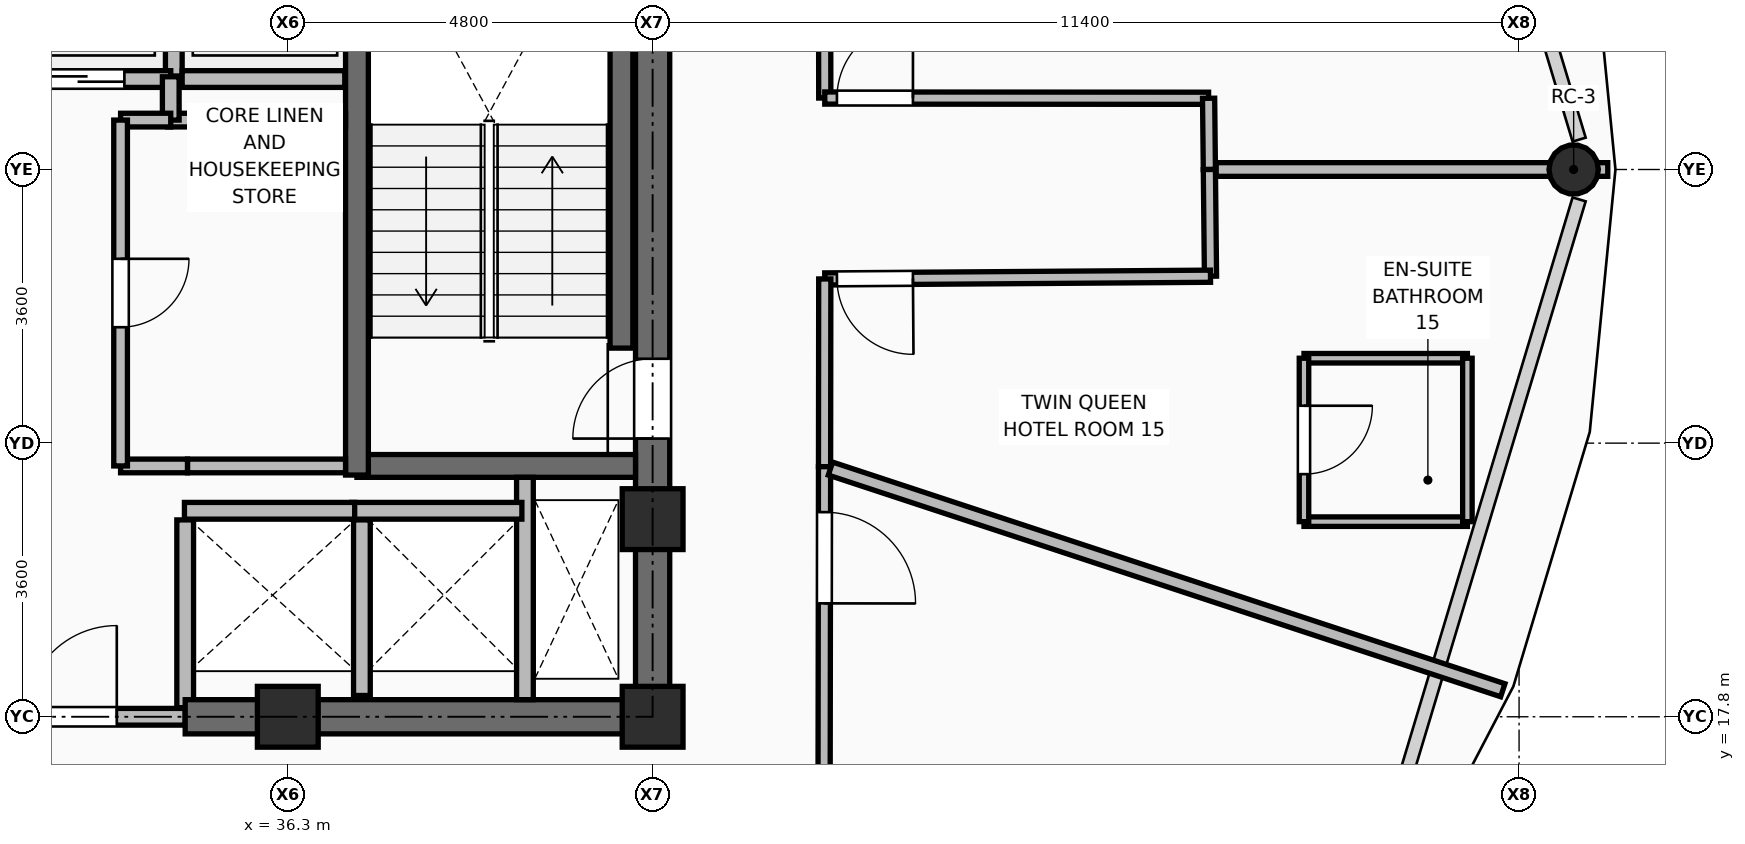
"""IFC4 building model, lengths in metres.
Left out: names, types, materials, properties, quantities, classifications, styles, units other than length and angle.
Written with IfcOpenShell. Run it as: python <this file> out.ifc"""

import sys

from ifc_helpers import new_model, si_unit, direction, frame, frame_2d, origin, origin_2d, place, context, subcontext, project, spatial, rectangle, hollow_circle, extrude, element, fill, save


model = new_model("IFC4")
c1 = context("Model", 3, precision=1e-05, world=origin(), true_north=direction((0.0, 1.0)))
c2 = subcontext(c1, "Body", "Model", "MODEL_VIEW")
j1 = project(units=[si_unit("LENGTHUNIT", "METRE"), si_unit("PLANEANGLEUNIT", "RADIAN")], contexts=[c1])
p1 = place(None, origin())
s1 = spatial("IfcSite", under=j1, at=p1, CompositionType="ELEMENT")
p2 = place(p1, origin())
s2 = spatial("IfcBuilding", under=s1, at=p2, CompositionType="ELEMENT")
p3 = place(p2, frame((0.0, 0.0, 249.9)))
s3 = spatial("IfcBuildingStorey", under=s2, at=p3, CompositionType="ELEMENT", Elevation=249.9)
for number, where, z_axis, x_axis in (
    (1, (36.3, 17.8, 0.0), (0.0, 0.0, 1.0), (1.0, 0.0, 0.0)),
    (2, (41.1, 17.8, 0.0), (0.0, 0.0, 1.0), (1.0, 0.0, 0.0)),
    (3, (41.1, 20.4, 0.0), (0.0, 0.0, 1.0), (1.0, 0.0, 0.0)),
):
    element("IfcColumn", number, at=place(p3, frame(where, z_axis=z_axis, x_axis=x_axis)), inside=s3, PredefinedType="COLUMN", context=c2, shape_type="SweptSolid", body=[
        extrude(rectangle(XDim=0.8, YDim=0.8, at=origin_2d()), origin(), (0.0, 0.0, 1.0), 3.75),
    ])
p4 = place(p3, frame((53.218, 25.0, 0.0), z_axis=(-0.104543948341, 0.0, 0.9945202677), x_axis=(0.0, -1.0, 0.0)))
e4 = element("IfcColumn", 4, at=p4, inside=s3, PredefinedType="COLUMN", context=c2, shape_type="SweptSolid", body=[
    extrude(hollow_circle(Radius=0.325, WallThickness=0.03, at=origin_2d()), origin(), (0.0, 0.0, 1.0), 3.519),
])
p5 = place(p3, frame((34.95, 17.92, 0.0), z_axis=(0.0, 0.0, 1.0), x_axis=(0.0, 1.0, 0.0)))
e5 = element("IfcWall", 5, at=p5, inside=s3, PredefinedType="PARTITIONING", context=c2, shape_type="SweptSolid", body=[
    extrude(rectangle(XDim=2.47, YDim=0.22, at=frame_2d((1.235, 0.0))), origin(), (0.0, 0.0, 1.0), 3.475),
])
p6 = place(p3, frame((37.275, 18.08, 0.0), z_axis=(0.0, 0.0, 1.0), x_axis=(0.0, 1.0, 0.0)))
e6 = element("IfcWall", 6, at=p6, inside=s3, PredefinedType="PARTITIONING", context=c2, shape_type="SweptSolid", body=[
    extrude(rectangle(XDim=2.31, YDim=0.22, at=frame_2d((1.155, 0.0))), origin(), (0.0, 0.0, 1.0), 3.475),
])
p7 = place(p3, frame((34.8, 26.23, 0.0), z_axis=(0.0, 0.0, 1.0), x_axis=(0.0, 1.0, 0.0)))
e7 = element("IfcWall", 7, at=p7, inside=s3, PredefinedType="PARTITIONING", context=c2, shape_type="SweptSolid", body=[
    extrude(rectangle(XDim=2.21, YDim=0.22, at=frame_2d((1.105, 0.0))), origin(), (0.0, 0.0, 1.0), 3.475),
])
p8 = place(p3, frame((34.91, 26.19, 0.0), z_axis=(0.0, 0.0, 1.0), x_axis=(1.0, 0.0, 0.0)))
e8 = element("IfcWall", 8, at=p8, inside=s3, PredefinedType="PARTITIONING", context=c2, shape_type="SweptSolid", body=[
    extrude(rectangle(XDim=2.14, YDim=0.22, at=frame_2d((1.07, 0.0))), origin(), (0.0, 0.0, 1.0), 3.475),
])
p9 = place(p3, frame((32.45, 17.8, 0.0), z_axis=(0.0, 0.0, 1.0), x_axis=(1.0, 0.0, 0.0)))
e9 = element("IfcWall", 9, at=p9, inside=s3, PredefinedType="PARTITIONING", context=c2, shape_type="SweptSolid", body=[
    extrude(rectangle(XDim=2.5, YDim=0.22, at=frame_2d((1.25, 0.0))), origin(), (0.0, 0.0, 1.0), 3.012),
])
p10 = place(p9, frame((0.4, 0.0, 0.0)))
e10 = element("IfcOpeningElement", 10, at=p10, cuts=e9, PredefinedType="OPENING", context=c2, shape_type="SweptSolid", body=[
    extrude(rectangle(XDim=1.2, YDim=2.1, at=frame_2d((0.6, 1.05))), frame((0.0, 0.12, 0.0), z_axis=(0.0, -1.0, 0.0), x_axis=(1.0, 0.0, 0.0)), (0.0, 0.0, 1.0), 0.24),
])
p11 = place(p3, frame((34.95, 17.8, 0.0), z_axis=(0.0, 0.0, 1.0), x_axis=(1.0, 0.0, 0.0)))
e11 = element("IfcWall", 11, at=p11, inside=s3, PredefinedType="SHEAR", context=c2, shape_type="SweptSolid", body=[
    extrude(rectangle(XDim=6.375, YDim=0.45, at=frame_2d((3.188, 0.0))), origin(), (0.0, 0.0, 1.0), 3.5),
])
p12 = place(p3, frame((41.1, 18.025, 0.0), z_axis=(0.0, 0.0, 1.0), x_axis=(0.0, 1.0, 0.0)))
e12 = element("IfcWall", 12, at=p12, inside=s3, PredefinedType="SHEAR", context=c2, shape_type="SweptSolid", body=[
    extrude(rectangle(XDim=14.2, YDim=0.45, at=frame_2d((7.1, 0.0))), origin(), (0.0, 0.0, 1.0), 3.5),
])
p13 = place(p12, frame((3.435, 0.0, 0.0)))
e13 = element("IfcOpeningElement", 13, at=p13, cuts=e12, PredefinedType="OPENING", context=c2, shape_type="SweptSolid", body=[
    extrude(rectangle(XDim=1.05, YDim=2.1, at=frame_2d((0.525, 1.05))), frame((0.0, 0.235, 0.0), z_axis=(0.0, -1.0, 0.0), x_axis=(1.0, 0.0, 0.0)), (0.0, 0.0, 1.0), 0.47),
])
p14 = place(p3, frame((37.21, 21.1, 0.0), z_axis=(0.0, 0.0, 1.0), x_axis=(1.0, 0.0, 0.0)))
e14 = element("IfcWall", 14, at=p14, inside=s3, PredefinedType="SHEAR", context=c2, shape_type="SweptSolid", body=[
    extrude(rectangle(XDim=3.665, YDim=0.3, at=frame_2d((1.833, 0.0))), origin(), (0.0, 0.0, 1.0), 3.5),
])
p15 = place(p3, frame((37.21, 20.98, 0.0), z_axis=(0.0, 0.0, 1.0), x_axis=(0.0, 1.0, 0.0)))
e15 = element("IfcWall", 15, at=p15, inside=s3, PredefinedType="SHEAR", context=c2, shape_type="SweptSolid", body=[
    extrude(rectangle(XDim=7.99, YDim=0.3, at=frame_2d((3.995, 0.0))), origin(), (0.0, 0.0, 1.0), 3.5),
])
p16 = place(p3, frame((40.69, 22.65, 0.0), z_axis=(0.0, 0.0, 1.0), x_axis=(0.0, 1.0, 0.0)))
e16 = element("IfcWall", 16, at=p16, inside=s3, PredefinedType="SHEAR", context=c2, shape_type="SweptSolid", body=[
    extrude(rectangle(XDim=6.2, YDim=0.3, at=frame_2d((3.1, 0.0))), origin(), (0.0, 0.0, 1.0), 3.5),
])
p17 = place(p3, frame((39.42, 18.025, 0.0), z_axis=(0.0, 0.0, 1.0), x_axis=(0.0, 1.0, 0.0)))
e17 = element("IfcWall", 17, at=p17, inside=s3, PredefinedType="PARTITIONING", context=c2, shape_type="SweptSolid", body=[
    extrude(rectangle(XDim=2.925, YDim=0.22, at=frame_2d((1.462, 0.0))), origin(), (0.0, 0.0, 1.0), 3.48),
])
for number, where, z_axis, x_axis in (
    (18, (37.14, 20.51, 0.0), (0.0, 0.0, 1.0), (1.0, 0.0, 0.0)),
    (19, (34.94, 20.51, 0.0), (0.0, 0.0, 1.0), (1.0, 0.0, 0.0)),
):
    element("IfcWall", number, at=place(p3, frame(where, z_axis=z_axis, x_axis=x_axis)), inside=s3, PredefinedType="PARTITIONING", context=c2, shape_type="SweptSolid", body=[
        extrude(rectangle(XDim=2.24, YDim=0.22, at=frame_2d((1.12, 0.0))), origin(), (0.0, 0.0, 1.0), 3.48),
    ])
p18 = place(p3, frame((32.44, 26.19, 0.0), z_axis=(0.0, 0.0, 1.0), x_axis=(1.0, 0.0, 0.0)))
e20 = element("IfcWall", 20, at=p18, inside=s3, PredefinedType="PARTITIONING", context=c2, shape_type="SweptSolid", body=[
    extrude(rectangle(XDim=2.32, YDim=0.22, at=frame_2d((1.16, 0.0))), origin(), (0.0, 0.0, 1.0), 3.48),
])
p19 = place(p18, frame((0.61, 0.0, 0.0)))
e21 = element("IfcOpeningElement", 21, at=p19, cuts=e20, PredefinedType="OPENING", context=c2, shape_type="SweptSolid", body=[
    extrude(rectangle(XDim=1.1, YDim=2.2, at=frame_2d((0.55, 1.1))), frame((0.0, 0.12, 0.0), z_axis=(0.0, -1.0, 0.0), x_axis=(1.0, 0.0, 0.0)), (0.0, 0.0, 1.0), 0.24),
])
p20 = place(p3, frame((34.98, 21.1, 0.0), z_axis=(0.0, 0.0, 1.0), x_axis=(1.0, 0.0, 0.0)))
e22 = element("IfcWall", 22, at=p20, inside=s3, PredefinedType="PARTITIONING", context=c2, shape_type="SweptSolid", body=[
    extrude(rectangle(XDim=2.08, YDim=0.18, at=frame_2d((1.04, 0.0))), origin(), (0.0, 0.0, 1.0), 3.48),
])
p21 = place(p3, frame((34.72, 25.65, 0.0), z_axis=(0.0, 0.0, 1.0), x_axis=(1.0, 0.0, 0.0)))
e23 = element("IfcWall", 23, at=p21, inside=s3, PredefinedType="PARTITIONING", context=c2, shape_type="SweptSolid", body=[
    extrude(rectangle(XDim=2.34, YDim=0.18, at=frame_2d((1.17, 0.0))), origin(), (0.0, 0.0, 1.0), 3.48),
])
p22 = place(p3, frame((34.76, 25.65, 0.0), z_axis=(0.0, 0.0, 1.0), x_axis=(0.0, 1.0, 0.0)))
e24 = element("IfcWall", 24, at=p22, inside=s3, PredefinedType="PARTITIONING", context=c2, shape_type="SweptSolid", body=[
    extrude(rectangle(XDim=0.57, YDim=0.22, at=frame_2d((0.285, 0.0))), origin(), (0.0, 0.0, 1.0), 3.48),
])
p23 = place(p3, frame((34.1, 21.1, 0.0), z_axis=(0.0, 0.0, 1.0), x_axis=(1.0, 0.0, 0.0)))
e25 = element("IfcWall", 25, at=p23, inside=s3, PredefinedType="PARTITIONING", context=c2, shape_type="SweptSolid", body=[
    extrude(rectangle(XDim=0.88, YDim=0.18, at=frame_2d((0.44, 0.0))), origin(), (0.0, 0.0, 1.0), 3.48),
])
p24 = place(p3, frame((34.1, 25.65, 0.0), z_axis=(0.0, 0.0, 1.0), x_axis=(1.0, 0.0, 0.0)))
e26 = element("IfcWall", 26, at=p24, inside=s3, PredefinedType="PARTITIONING", context=c2, shape_type="SweptSolid", body=[
    extrude(rectangle(XDim=0.66, YDim=0.18, at=frame_2d((0.33, 0.0))), origin(), (0.0, 0.0, 1.0), 3.48),
])
p25 = place(p3, frame((34.1, 21.1, 0.0), z_axis=(0.0, 0.0, 1.0), x_axis=(0.0, 1.0, 0.0)))
e27 = element("IfcWall", 27, at=p25, inside=s3, PredefinedType="PARTITIONING", context=c2, shape_type="SweptSolid", body=[
    extrude(rectangle(XDim=4.55, YDim=0.18, at=frame_2d((2.275, 0.0))), origin(), (0.0, 0.0, 1.0), 3.48),
])
p26 = place(p25, frame((1.825, 0.0, 0.0)))
e28 = element("IfcOpeningElement", 28, at=p26, cuts=e27, PredefinedType="OPENING", context=c2, shape_type="SweptSolid", body=[
    extrude(rectangle(XDim=0.9, YDim=2.1, at=frame_2d((0.45, 1.05))), frame((0.0, 0.1, 0.0), z_axis=(0.0, -1.0, 0.0), x_axis=(1.0, 0.0, 0.0)), (0.0, 0.0, 1.0), 0.2),
])
p27 = place(p3, frame((43.361, 28.909, 0.0), z_axis=(0.0, 0.0, 1.0), x_axis=(0.001315680137, -0.999999134493, 0.0)))
e29 = element("IfcWall", 29, at=p27, inside=s3, PredefinedType="PARTITIONING", context=c2, shape_type="SweptSolid", body=[
    extrude(rectangle(XDim=2.969, YDim=0.16, at=frame_2d((1.484, 0.0))), origin(), (0.0, 0.0, 1.0), 3.48),
])
p28 = place(p3, frame((43.365, 25.94, 0.0), z_axis=(0.0, 0.0, 1.0), x_axis=(0.999999831724, -0.000580130432, 0.0)))
e30 = element("IfcWall", 30, at=p28, inside=s3, PredefinedType="PARTITIONING", context=c2, shape_type="SweptSolid", body=[
    extrude(rectangle(XDim=5.05, YDim=0.16, at=frame_2d((2.525, 0.0))), origin(), (0.0, 0.0, 1.0), 3.48),
])
p29 = place(p28, frame((0.16, 0.0, 0.0)))
e31 = element("IfcOpeningElement", 31, at=p29, cuts=e30, PredefinedType="OPENING", context=c2, shape_type="SweptSolid", body=[
    extrude(rectangle(XDim=1.0, YDim=2.1, at=frame_2d((0.5, 1.05))), frame((0.0, 0.09, 0.0), z_axis=(0.0, -1.0, 0.0), x_axis=(1.0, 0.0, 0.0)), (0.0, 0.0, 1.0), 0.18),
])
p30 = place(p3, frame((48.415, 25.937, 0.0), z_axis=(0.0, 0.0, 1.0), x_axis=(0.010682037718, -0.999942945407, 0.0)))
e32 = element("IfcWall", 32, at=p30, inside=s3, PredefinedType="PARTITIONING", context=c2, shape_type="SweptSolid", body=[
    extrude(rectangle(XDim=0.937, YDim=0.16, at=frame_2d((0.469, 0.0))), origin(), (0.0, 0.0, 1.0), 3.48),
])
p31 = place(p3, frame((48.425, 25.0, 0.0), z_axis=(0.0, 0.0, 1.0), x_axis=(0.010606254369, -0.999943752102, 0.0)))
e33 = element("IfcWall", 33, at=p31, inside=s3, PredefinedType="PARTITIONING", context=c2, shape_type="SweptSolid", body=[
    extrude(rectangle(XDim=1.404, YDim=0.16, at=frame_2d((0.702, 0.0))), origin(), (0.0, 0.0, 1.0), 3.48),
])
p32 = place(p3, frame((48.44, 23.596, 0.0), z_axis=(0.0, 0.0, 1.0), x_axis=(-0.999974996273, -0.007071550702, 0.0)))
e34 = element("IfcWall", 34, at=p32, inside=s3, PredefinedType="PARTITIONING", context=c2, shape_type="SweptSolid", body=[
    extrude(rectangle(XDim=5.075, YDim=0.16, at=frame_2d((2.538, 0.0))), origin(), (0.0, 0.0, 1.0), 3.012),
])
p33 = place(p32, frame((3.915, 0.0, 0.0)))
e35 = element("IfcOpeningElement", 35, at=p33, cuts=e34, PredefinedType="OPENING", context=c2, shape_type="SweptSolid", body=[
    extrude(rectangle(XDim=1.0, YDim=2.1, at=frame_2d((0.5, 1.05))), frame((0.0, 0.09, 0.0), z_axis=(0.0, -1.0, 0.0), x_axis=(1.0, 0.0, 0.0)), (0.0, 0.0, 1.0), 0.18),
])
p34 = place(p3, frame((43.365, 23.56, 0.0), z_axis=(0.0, 0.0, 1.0), x_axis=(-0.001186121534, -0.999999296558, 0.0)))
e36 = element("IfcWall", 36, at=p34, inside=s3, PredefinedType="PARTITIONING", context=c2, shape_type="SweptSolid", body=[
    extrude(rectangle(XDim=2.47, YDim=0.16, at=frame_2d((1.235, 0.0))), origin(), (0.0, 0.0, 1.0), 3.012),
])
p35 = place(p3, frame((43.362, 21.09, 0.0), z_axis=(0.0, 0.0, 1.0), x_axis=(-0.001399667798, -0.999999020465, 0.0)))
e37 = element("IfcWall", 37, at=p35, inside=s3, PredefinedType="PARTITIONING", context=c2, shape_type="SweptSolid", body=[
    extrude(rectangle(XDim=5.756, YDim=0.16, at=frame_2d((2.878, 0.0))), origin(), (0.0, 0.0, 1.0), 3.012),
])
p36 = place(p35, frame((0.598, 0.0, 0.0)))
e38 = element("IfcOpeningElement", 38, at=p36, cuts=e37, PredefinedType="OPENING", context=c2, shape_type="SweptSolid", body=[
    extrude(rectangle(XDim=1.2, YDim=2.1, at=frame_2d((0.6, 1.05))), frame((0.0, 0.09, 0.0), z_axis=(0.0, -1.0, 0.0), x_axis=(1.0, 0.0, 0.0)), (0.0, 0.0, 1.0), 0.18),
])
p37 = place(p3, frame((43.44, 21.065, 0.0), z_axis=(0.0, 0.0, 1.0), x_axis=(0.949729147415, -0.313072749613, 0.0)))
e39 = element("IfcWall", 39, at=p37, inside=s3, PredefinedType="PARTITIONING", context=c2, shape_type="SweptSolid", body=[
    extrude(rectangle(XDim=9.314, YDim=0.18, at=frame_2d((4.657, 0.0))), origin(), (0.0, 0.0, 1.0), 2.855),
])
p38 = place(p3, frame((48.515, 25.0, 0.0), z_axis=(0.0, 0.0, 1.0), x_axis=(1.0, 0.0, 0.0)))
e40 = element("IfcWall", 40, at=p38, inside=s3, PredefinedType="PARTITIONING", context=c2, shape_type="SweptSolid", body=[
    extrude(rectangle(XDim=5.152, YDim=0.18, at=frame_2d((2.576, 0.0))), origin(), (0.0, 0.0, 1.0), 2.855),
])
for number, where, z_axis, x_axis in (
    (41, (49.67, 20.367, 0.0), (0.0, 0.0, 1.0), (1.0, 0.0, 0.0)),
    (42, (49.67, 22.517, 0.0), (0.0, 0.0, 1.0), (1.0, 0.0, 0.0)),
):
    element("IfcWall", number, at=place(p3, frame(where, z_axis=z_axis, x_axis=x_axis)), inside=s3, PredefinedType="PARTITIONING", context=c2, shape_type="SweptSolid", body=[
        extrude(rectangle(XDim=2.15, YDim=0.125, at=frame_2d((1.075, 0.0))), origin(), (0.0, 0.0, 1.0), 2.855),
    ])
p39 = place(p3, frame((49.67, 20.367, 0.0), z_axis=(0.0, 0.0, 1.0), x_axis=(0.0, 1.0, 0.0)))
e43 = element("IfcWall", 43, at=p39, inside=s3, PredefinedType="PARTITIONING", context=c2, shape_type="SweptSolid", body=[
    extrude(rectangle(XDim=2.15, YDim=0.125, at=frame_2d((1.075, 0.0))), origin(), (0.0, 0.0, 1.0), 3.48),
])
p40 = place(p39, frame((0.625, 0.0, 0.0)))
e44 = element("IfcOpeningElement", 44, at=p40, cuts=e43, PredefinedType="OPENING", context=c2, shape_type="SweptSolid", body=[
    extrude(rectangle(XDim=0.9, YDim=2.1, at=frame_2d((0.45, 1.05))), frame((0.0, 0.073, 0.0), z_axis=(0.0, -1.0, 0.0), x_axis=(1.0, 0.0, 0.0)), (0.0, 0.0, 1.0), 0.145),
])
p41 = place(p3, frame((51.82, 20.367, 0.0), z_axis=(0.0, 0.0, 1.0), x_axis=(0.0, 1.0, 0.0)))
e45 = element("IfcWall", 45, at=p41, inside=s3, PredefinedType="PARTITIONING", context=c2, shape_type="SweptSolid", body=[
    extrude(rectangle(XDim=2.15, YDim=0.125, at=frame_2d((1.075, 0.0))), origin(), (0.0, 0.0, 1.0), 2.855),
])
p42 = place(p10, origin())
e46 = element("IfcDoor", 46, at=p42, inside=s3, OperationType="SINGLE_SWING_RIGHT", PredefinedType="DOOR", context=c2, shape_type="SweptSolid", body=[
    extrude(rectangle(XDim=1.2, YDim=2.1, at=frame_2d((0.6, 1.05))), frame((0.0, 0.025, 0.0), z_axis=(0.0, -1.0, 0.0), x_axis=(1.0, 0.0, 0.0)), (0.0, 0.0, 1.0), 0.05),
])
fill(e10, e46)
p43 = place(p13, origin())
e47 = element("IfcDoor", 47, at=p43, inside=s3, OperationType="SINGLE_SWING_LEFT", PredefinedType="DOOR", context=c2, shape_type="SweptSolid", body=[
    extrude(rectangle(XDim=1.05, YDim=2.1, at=frame_2d((0.525, 1.05))), frame((0.0, 0.025, 0.0), z_axis=(0.0, -1.0, 0.0), x_axis=(1.0, 0.0, 0.0)), (0.0, 0.0, 1.0), 0.05),
])
fill(e13, e47)
p44 = place(p19, frame((1.1, 0.0, 0.0), z_axis=(0.0, 0.0, 1.0), x_axis=(-1.0, 0.0, 0.0)))
e48 = element("IfcDoor", 48, at=p44, inside=s3, OperationType="DOUBLE_DOOR_SLIDING", PredefinedType="DOOR", context=c2, shape_type="SweptSolid", body=[
    extrude(rectangle(XDim=1.1, YDim=2.2, at=frame_2d((0.55, 1.1))), frame((0.0, 0.025, 0.0), z_axis=(0.0, -1.0, 0.0), x_axis=(1.0, 0.0, 0.0)), (0.0, 0.0, 1.0), 0.05),
])
fill(e21, e48)
p45 = place(p26, frame((0.9, 0.0, 0.0), z_axis=(0.0, 0.0, 1.0), x_axis=(-1.0, 0.0, 0.0)))
e49 = element("IfcDoor", 49, at=p45, inside=s3, OperationType="SINGLE_SWING_LEFT", PredefinedType="DOOR", context=c2, shape_type="SweptSolid", body=[
    extrude(rectangle(XDim=0.9, YDim=2.1, at=frame_2d((0.45, 1.05))), frame((0.0, 0.025, 0.0), z_axis=(0.0, -1.0, 0.0), x_axis=(1.0, 0.0, 0.0)), (0.0, 0.0, 1.0), 0.05),
])
fill(e28, e49)
p46 = place(p36, origin())
e50 = element("IfcDoor", 50, at=p46, inside=s3, OperationType="SINGLE_SWING_RIGHT", PredefinedType="DOOR", context=c2, shape_type="SweptSolid", body=[
    extrude(rectangle(XDim=1.2, YDim=2.1, at=frame_2d((0.6, 1.05))), frame((0.0, 0.025, 0.0), z_axis=(0.0, -1.0, 0.0), x_axis=(1.0, 0.0, 0.0)), (0.0, 0.0, 1.0), 0.05),
])
fill(e38, e50)
p47 = place(p40, frame((0.9, 0.0, 0.0), z_axis=(0.0, 0.0, 1.0), x_axis=(-1.0, 0.0, 0.0)))
e51 = element("IfcDoor", 51, at=p47, inside=s3, OperationType="SINGLE_SWING_LEFT", PredefinedType="DOOR", context=c2, shape_type="SweptSolid", body=[
    extrude(rectangle(XDim=0.9, YDim=2.1, at=frame_2d((0.45, 1.05))), frame((0.0, 0.025, 0.0), z_axis=(0.0, -1.0, 0.0), x_axis=(1.0, 0.0, 0.0)), (0.0, 0.0, 1.0), 0.05),
])
fill(e44, e51)
p48 = place(p33, origin())
e52 = element("IfcDoor", 52, at=p48, inside=s3, OperationType="SINGLE_SWING_LEFT", PredefinedType="DOOR", context=c2, shape_type="SweptSolid", body=[
    extrude(rectangle(XDim=1.0, YDim=2.1, at=frame_2d((0.5, 1.05))), frame((0.0, 0.025, 0.0), z_axis=(0.0, -1.0, 0.0), x_axis=(1.0, 0.0, 0.0)), (0.0, 0.0, 1.0), 0.05),
])
fill(e35, e52)
p49 = place(p29, origin())
e53 = element("IfcDoor", 53, at=p49, inside=s3, OperationType="SINGLE_SWING_RIGHT", PredefinedType="DOOR", context=c2, shape_type="SweptSolid", body=[
    extrude(rectangle(XDim=1.0, YDim=2.1, at=frame_2d((0.5, 1.05))), frame((0.0, 0.025, 0.0), z_axis=(0.0, -1.0, 0.0), x_axis=(1.0, 0.0, 0.0)), (0.0, 0.0, 1.0), 0.05),
])
fill(e31, e53)
save(model, sys.argv[1])
